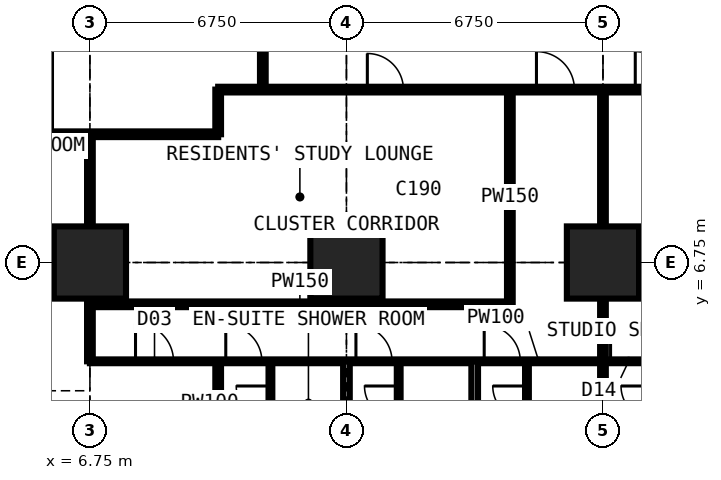
"""IFC4 building model, lengths in metres.
Left out: names, types, materials, properties, quantities, classifications, styles, units other than length and angle.
Written with IfcOpenShell. Run it as: python <this file> out.ifc"""

import sys

from ifc_helpers import new_model, si_unit, direction, frame, frame_2d, origin, origin_2d, place, context, subcontext, project, spatial, rectangle, extrude, element, fill, save


model = new_model("IFC4")
c1 = context("Model", 3, precision=1e-05, world=origin(), true_north=direction((0.0, 1.0)))
c2 = subcontext(c1, "Body", "Model", "MODEL_VIEW")
j1 = project(units=[si_unit("LENGTHUNIT", "METRE"), si_unit("PLANEANGLEUNIT", "RADIAN")], contexts=[c1])
p1 = place(None, origin())
s1 = spatial("IfcSite", under=j1, at=p1, CompositionType="ELEMENT")
p2 = place(p1, origin())
s2 = spatial("IfcBuilding", under=s1, at=p2, CompositionType="ELEMENT")
p3 = place(p2, frame((0.0, 0.0, 18.0)))
s3 = spatial("IfcBuildingStorey", under=s2, at=p3, CompositionType="ELEMENT", Elevation=18.0)
for number, where, z_axis, x_axis in (
    (1, (6.75, 6.75, 0.0), (0.0, 0.0, 1.0), (1.0, 0.0, 0.0)),
    (2, (13.5, 6.75, 0.0), (0.0, 0.0, 1.0), (1.0, 0.0, 0.0)),
    (3, (20.25, 6.75, 0.0), (0.0, 0.0, 1.0), (1.0, 0.0, 0.0)),
):
    element("IfcColumn", number, at=place(p3, frame(where, z_axis=z_axis, x_axis=x_axis)), inside=s3, PredefinedType="COLUMN", context=c2, shape_type="SweptSolid", body=[
        extrude(rectangle(XDim=1.9, YDim=1.9, at=origin_2d()), origin(), (0.0, 0.0, 1.0), 3.6),
    ])
p4 = place(p3, frame((-0.734, 10.125, 0.0), z_axis=(0.0, 0.0, 1.0), x_axis=(1.0, 0.0, 0.0)))
e4 = element("IfcWall", 4, at=p4, inside=s3, PredefinedType="PARTITIONING", context=c2, shape_type="SweptSolid", body=[
    extrude(rectangle(XDim=10.859, YDim=0.15, at=frame_2d((5.429, 0.0))), origin(), (0.0, 0.0, 1.0), 3.375),
])
p5 = place(p3, frame((6.75, 4.15, 0.0), z_axis=(0.0, 0.0, 1.0), x_axis=(0.0, 1.0, 0.0)))
e5 = element("IfcWall", 5, at=p5, inside=s3, PredefinedType="PARTITIONING", context=c2, shape_type="SweptSolid", body=[
    extrude(rectangle(XDim=5.975, YDim=0.15, at=frame_2d((2.988, 0.0))), origin(), (0.0, 0.0, 1.0), 2.877),
])
p6 = place(p3, frame((6.75, 4.15, 0.0), z_axis=(0.0, 0.0, 1.0), x_axis=(1.0, 0.0, 0.0)))
e6 = element("IfcWall", 6, at=p6, inside=s3, PredefinedType="PARTITIONING", context=c2, shape_type="SweptSolid", body=[
    extrude(rectangle(XDim=23.625, YDim=0.1, at=frame_2d((11.812, 0.0))), origin(), (0.0, 0.0, 1.0), 3.375),
])
p7 = place(p6, frame((1.2, 0.0, 0.0)))
e7 = element("IfcOpeningElement", 7, at=p7, cuts=e6, PredefinedType="OPENING", context=c2, shape_type="SweptSolid", body=[
    extrude(rectangle(XDim=1.0, YDim=2.2, at=frame_2d((0.5, 1.1))), frame((0.0, 0.06, 0.0), z_axis=(0.0, -1.0, 0.0), x_axis=(1.0, 0.0, 0.0)), (0.0, 0.0, 1.0), 0.12),
])
p8 = place(p6, frame((3.575, 0.0, 0.0)))
e8 = element("IfcOpeningElement", 8, at=p8, cuts=e6, PredefinedType="OPENING", context=c2, shape_type="SweptSolid", body=[
    extrude(rectangle(XDim=0.95, YDim=2.2, at=frame_2d((0.475, 1.1))), frame((0.0, 0.06, 0.0), z_axis=(0.0, -1.0, 0.0), x_axis=(1.0, 0.0, 0.0)), (0.0, 0.0, 1.0), 0.12),
])
p9 = place(p6, frame((7.0, 0.0, 0.0)))
e9 = element("IfcOpeningElement", 9, at=p9, cuts=e6, PredefinedType="OPENING", context=c2, shape_type="SweptSolid", body=[
    extrude(rectangle(XDim=0.95, YDim=2.2, at=frame_2d((0.475, 1.1))), frame((0.0, 0.06, 0.0), z_axis=(0.0, -1.0, 0.0), x_axis=(1.0, 0.0, 0.0)), (0.0, 0.0, 1.0), 0.12),
])
p10 = place(p6, frame((10.375, 0.0, 0.0)))
e10 = element("IfcOpeningElement", 10, at=p10, cuts=e6, PredefinedType="OPENING", context=c2, shape_type="SweptSolid", body=[
    extrude(rectangle(XDim=0.95, YDim=2.2, at=frame_2d((0.475, 1.1))), frame((0.0, 0.06, 0.0), z_axis=(0.0, -1.0, 0.0), x_axis=(1.0, 0.0, 0.0)), (0.0, 0.0, 1.0), 0.12),
])
p11 = place(p6, frame((13.7, 0.0, 0.0)))
e11 = element("IfcOpeningElement", 11, at=p11, cuts=e6, PredefinedType="OPENING", context=c2, shape_type="SweptSolid", body=[
    extrude(rectangle(XDim=0.95, YDim=2.2, at=frame_2d((0.475, 1.1))), frame((0.0, 0.06, 0.0), z_axis=(0.0, -1.0, 0.0), x_axis=(1.0, 0.0, 0.0)), (0.0, 0.0, 1.0), 0.12),
])
p12 = place(p6, frame((17.125, 0.0, 0.0)))
e12 = element("IfcOpeningElement", 12, at=p12, cuts=e6, PredefinedType="OPENING", context=c2, shape_type="SweptSolid", body=[
    extrude(rectangle(XDim=0.95, YDim=2.2, at=frame_2d((0.475, 1.1))), frame((0.0, 0.06, 0.0), z_axis=(0.0, -1.0, 0.0), x_axis=(1.0, 0.0, 0.0)), (0.0, 0.0, 1.0), 0.12),
])
p13 = place(p6, frame((20.5, 0.0, 0.0)))
e13 = element("IfcOpeningElement", 13, at=p13, cuts=e6, PredefinedType="OPENING", context=c2, shape_type="SweptSolid", body=[
    extrude(rectangle(XDim=0.95, YDim=2.2, at=frame_2d((0.475, 1.1))), frame((0.0, 0.06, 0.0), z_axis=(0.0, -1.0, 0.0), x_axis=(1.0, 0.0, 0.0)), (0.0, 0.0, 1.0), 0.12),
])
p14 = place(p3, frame((6.75, 5.65, 0.0), z_axis=(0.0, 0.0, 1.0), x_axis=(1.0, 0.0, 0.0)))
e14 = element("IfcWall", 14, at=p14, inside=s3, PredefinedType="PARTITIONING", context=c2, shape_type="SweptSolid", body=[
    extrude(rectangle(XDim=11.05, YDim=0.15, at=frame_2d((5.525, 0.0))), origin(), (0.0, 0.0, 1.0), 3.375),
])
p15 = place(p3, frame((10.125, -0.734, 0.0), z_axis=(0.0, 0.0, 1.0), x_axis=(0.0, 1.0, 0.0)))
e15 = element("IfcWall", 15, at=p15, inside=s3, PredefinedType="PARTITIONING", context=c2, shape_type="SweptSolid", body=[
    extrude(rectangle(XDim=4.884, YDim=0.15, at=frame_2d((2.442, 0.0))), origin(), (0.0, 0.0, 1.0), 3.375),
])
p16 = place(p3, frame((10.125, 10.125, 0.0), z_axis=(0.0, 0.0, 1.0), x_axis=(0.0, 1.0, 0.0)))
e16 = element("IfcWall", 16, at=p16, inside=s3, PredefinedType="PARTITIONING", context=c2, shape_type="SweptSolid", body=[
    extrude(rectangle(XDim=1.175, YDim=0.15, at=frame_2d((0.587, 0.0))), origin(), (0.0, 0.0, 1.0), 3.375),
])
p17 = place(p3, frame((10.125, 11.3, 0.0), z_axis=(0.0, 0.0, 1.0), x_axis=(1.0, 0.0, 0.0)))
e17 = element("IfcWall", 17, at=p17, inside=s3, PredefinedType="PARTITIONING", context=c2, shape_type="SweptSolid", body=[
    extrude(rectangle(XDim=20.675, YDim=0.15, at=frame_2d((10.337, 0.0))), origin(), (0.0, 0.0, 1.0), 3.375),
])
p18 = place(p17, frame((8.375, 0.0, 0.0)))
e18 = element("IfcOpeningElement", 18, at=p18, cuts=e17, PredefinedType="OPENING", context=c2, shape_type="SweptSolid", body=[
    extrude(rectangle(XDim=1.0, YDim=2.2, at=frame_2d((0.5, 1.1))), frame((0.0, 0.085, 0.0), z_axis=(0.0, -1.0, 0.0), x_axis=(1.0, 0.0, 0.0)), (0.0, 0.0, 1.0), 0.17),
])
p19 = place(p17, frame((10.975, 0.0, 0.0)))
e19 = element("IfcOpeningElement", 19, at=p19, cuts=e17, PredefinedType="OPENING", context=c2, shape_type="SweptSolid", body=[
    extrude(rectangle(XDim=1.0, YDim=2.2, at=frame_2d((0.5, 1.1))), frame((0.0, 0.085, 0.0), z_axis=(0.0, -1.0, 0.0), x_axis=(1.0, 0.0, 0.0)), (0.0, 0.0, 1.0), 0.17),
])
p20 = place(p17, frame((3.925, 0.0, 0.0)))
e20 = element("IfcOpeningElement", 20, at=p20, cuts=e17, PredefinedType="OPENING", context=c2, shape_type="SweptSolid", body=[
    extrude(rectangle(XDim=0.95, YDim=2.2, at=frame_2d((0.475, 1.1))), frame((0.0, 0.085, 0.0), z_axis=(0.0, -1.0, 0.0), x_axis=(1.0, 0.0, 0.0)), (0.0, 0.0, 1.0), 0.17),
])
p21 = place(p3, frame((11.3, 11.3, 0.0), z_axis=(0.0, 0.0, 1.0), x_axis=(0.0, 1.0, 0.0)))
e21 = element("IfcWall", 21, at=p21, inside=s3, PredefinedType="PARTITIONING", context=c2, shape_type="SweptSolid", body=[
    extrude(rectangle(XDim=19.075, YDim=0.15, at=frame_2d((9.538, 0.0))), origin(), (0.0, 0.0, 1.0), 3.375),
])
p22 = place(p21, frame((10.137, 0.0, 0.0)))
e22 = element("IfcOpeningElement", 22, at=p22, cuts=e21, PredefinedType="OPENING", context=c2, shape_type="SweptSolid", body=[
    extrude(rectangle(XDim=1.0, YDim=2.2, at=frame_2d((0.5, 1.1))), frame((0.0, 0.085, 0.0), z_axis=(0.0, -1.0, 0.0), x_axis=(1.0, 0.0, 0.0)), (0.0, 0.0, 1.0), 0.17),
])
p23 = place(p3, frame((11.5, 1.95, 0.0), z_axis=(0.0, 0.0, 1.0), x_axis=(0.0, 1.0, 0.0)))
e23 = element("IfcWall", 23, at=p23, inside=s3, PredefinedType="PARTITIONING", context=c2, shape_type="SweptSolid", body=[
    extrude(rectangle(XDim=2.2, YDim=0.1, at=frame_2d((1.1, 0.0))), origin(), (0.0, 0.0, 1.0), 3.375),
])
p24 = place(p23, frame((0.65, 0.0, 0.0)))
e24 = element("IfcOpeningElement", 24, at=p24, cuts=e23, PredefinedType="OPENING", context=c2, shape_type="SweptSolid", body=[
    extrude(rectangle(XDim=0.9, YDim=2.2, at=frame_2d((0.45, 1.1))), frame((0.0, 0.06, 0.0), z_axis=(0.0, -1.0, 0.0), x_axis=(1.0, 0.0, 0.0)), (0.0, 0.0, 1.0), 0.12),
])
p25 = place(p3, frame((13.5, -0.734, 0.0), z_axis=(0.0, 0.0, 1.0), x_axis=(0.0, 1.0, 0.0)))
e25 = element("IfcWall", 25, at=p25, inside=s3, PredefinedType="PARTITIONING", context=c2, shape_type="SweptSolid", body=[
    extrude(rectangle(XDim=4.884, YDim=0.175, at=frame_2d((2.442, 0.0))), origin(), (0.0, 0.0, 1.0), 2.877),
])
p26 = place(p3, frame((14.875, 1.95, 0.0), z_axis=(0.0, 0.0, 1.0), x_axis=(0.0, 1.0, 0.0)))
e26 = element("IfcWall", 26, at=p26, inside=s3, PredefinedType="PARTITIONING", context=c2, shape_type="SweptSolid", body=[
    extrude(rectangle(XDim=2.2, YDim=0.1, at=frame_2d((1.1, 0.0))), origin(), (0.0, 0.0, 1.0), 3.375),
])
p27 = place(p26, frame((0.65, 0.0, 0.0)))
e27 = element("IfcOpeningElement", 27, at=p27, cuts=e26, PredefinedType="OPENING", context=c2, shape_type="SweptSolid", body=[
    extrude(rectangle(XDim=0.9, YDim=2.2, at=frame_2d((0.45, 1.1))), frame((0.0, 0.06, 0.0), z_axis=(0.0, -1.0, 0.0), x_axis=(1.0, 0.0, 0.0)), (0.0, 0.0, 1.0), 0.12),
])
p28 = place(p3, frame((16.875, -0.734, 0.0), z_axis=(0.0, 0.0, 1.0), x_axis=(0.0, 1.0, 0.0)))
e28 = element("IfcWall", 28, at=p28, inside=s3, PredefinedType="PARTITIONING", context=c2, shape_type="SweptSolid", body=[
    extrude(rectangle(XDim=4.884, YDim=0.175, at=frame_2d((2.442, 0.0))), origin(), (0.0, 0.0, 1.0), 3.375),
])
p29 = place(p3, frame((17.8, 5.65, 0.0), z_axis=(0.0, 0.0, 1.0), x_axis=(0.0, 1.0, 0.0)))
e29 = element("IfcWall", 29, at=p29, inside=s3, PredefinedType="PARTITIONING", context=c2, shape_type="SweptSolid", body=[
    extrude(rectangle(XDim=5.65, YDim=0.15, at=frame_2d((2.825, 0.0))), origin(), (0.0, 0.0, 1.0), 3.375),
])
p30 = place(p3, frame((18.25, 1.95, 0.0), z_axis=(0.0, 0.0, 1.0), x_axis=(0.0, 1.0, 0.0)))
e30 = element("IfcWall", 30, at=p30, inside=s3, PredefinedType="PARTITIONING", context=c2, shape_type="SweptSolid", body=[
    extrude(rectangle(XDim=2.2, YDim=0.1, at=frame_2d((1.1, 0.0))), origin(), (0.0, 0.0, 1.0), 3.375),
])
p31 = place(p30, frame((0.65, 0.0, 0.0)))
e31 = element("IfcOpeningElement", 31, at=p31, cuts=e30, PredefinedType="OPENING", context=c2, shape_type="SweptSolid", body=[
    extrude(rectangle(XDim=0.9, YDim=2.2, at=frame_2d((0.45, 1.1))), frame((0.0, 0.06, 0.0), z_axis=(0.0, -1.0, 0.0), x_axis=(1.0, 0.0, 0.0)), (0.0, 0.0, 1.0), 0.12),
])
p32 = place(p3, frame((20.25, -0.734, 0.0), z_axis=(0.0, 0.0, 1.0), x_axis=(0.0, 1.0, 0.0)))
e32 = element("IfcWall", 32, at=p32, inside=s3, PredefinedType="PARTITIONING", context=c2, shape_type="SweptSolid", body=[
    extrude(rectangle(XDim=12.034, YDim=0.15, at=frame_2d((6.017, 0.0))), origin(), (0.0, 0.0, 1.0), 2.61),
])
p33 = place(p7, origin())
e33 = element("IfcDoor", 33, at=p33, inside=s3, OperationType="SINGLE_SWING_LEFT", PredefinedType="DOOR", context=c2, shape_type="SweptSolid", body=[
    extrude(rectangle(XDim=1.0, YDim=2.2, at=frame_2d((0.5, 1.1))), frame((0.0, 0.025, 0.0), z_axis=(0.0, -1.0, 0.0), x_axis=(1.0, 0.0, 0.0)), (0.0, 0.0, 1.0), 0.05),
])
fill(e7, e33)
p34 = place(p8, origin())
e34 = element("IfcDoor", 34, at=p34, inside=s3, OperationType="SINGLE_SWING_LEFT", PredefinedType="DOOR", context=c2, shape_type="SweptSolid", body=[
    extrude(rectangle(XDim=0.95, YDim=2.2, at=frame_2d((0.475, 1.1))), frame((0.0, 0.025, 0.0), z_axis=(0.0, -1.0, 0.0), x_axis=(1.0, 0.0, 0.0)), (0.0, 0.0, 1.0), 0.05),
])
fill(e8, e34)
p35 = place(p24, origin())
e35 = element("IfcDoor", 35, at=p35, inside=s3, OperationType="SINGLE_SWING_RIGHT", PredefinedType="DOOR", context=c2, shape_type="SweptSolid", body=[
    extrude(rectangle(XDim=0.9, YDim=2.2, at=frame_2d((0.45, 1.1))), frame((0.0, 0.025, 0.0), z_axis=(0.0, -1.0, 0.0), x_axis=(1.0, 0.0, 0.0)), (0.0, 0.0, 1.0), 0.05),
])
fill(e24, e35)
p36 = place(p9, origin())
e36 = element("IfcDoor", 36, at=p36, inside=s3, OperationType="SINGLE_SWING_LEFT", PredefinedType="DOOR", context=c2, shape_type="SweptSolid", body=[
    extrude(rectangle(XDim=0.95, YDim=2.2, at=frame_2d((0.475, 1.1))), frame((0.0, 0.025, 0.0), z_axis=(0.0, -1.0, 0.0), x_axis=(1.0, 0.0, 0.0)), (0.0, 0.0, 1.0), 0.05),
])
fill(e9, e36)
p37 = place(p27, origin())
e37 = element("IfcDoor", 37, at=p37, inside=s3, OperationType="SINGLE_SWING_RIGHT", PredefinedType="DOOR", context=c2, shape_type="SweptSolid", body=[
    extrude(rectangle(XDim=0.9, YDim=2.2, at=frame_2d((0.45, 1.1))), frame((0.0, 0.025, 0.0), z_axis=(0.0, -1.0, 0.0), x_axis=(1.0, 0.0, 0.0)), (0.0, 0.0, 1.0), 0.05),
])
fill(e27, e37)
p38 = place(p10, origin())
e38 = element("IfcDoor", 38, at=p38, inside=s3, OperationType="SINGLE_SWING_LEFT", PredefinedType="DOOR", context=c2, shape_type="SweptSolid", body=[
    extrude(rectangle(XDim=0.95, YDim=2.2, at=frame_2d((0.475, 1.1))), frame((0.0, 0.025, 0.0), z_axis=(0.0, -1.0, 0.0), x_axis=(1.0, 0.0, 0.0)), (0.0, 0.0, 1.0), 0.05),
])
fill(e10, e38)
p39 = place(p31, origin())
e39 = element("IfcDoor", 39, at=p39, inside=s3, OperationType="SINGLE_SWING_RIGHT", PredefinedType="DOOR", context=c2, shape_type="SweptSolid", body=[
    extrude(rectangle(XDim=0.9, YDim=2.2, at=frame_2d((0.45, 1.1))), frame((0.0, 0.025, 0.0), z_axis=(0.0, -1.0, 0.0), x_axis=(1.0, 0.0, 0.0)), (0.0, 0.0, 1.0), 0.05),
])
fill(e31, e39)
p40 = place(p18, origin())
e40 = element("IfcDoor", 40, at=p40, inside=s3, OperationType="SINGLE_SWING_LEFT", PredefinedType="DOOR", context=c2, shape_type="SweptSolid", body=[
    extrude(rectangle(XDim=1.0, YDim=2.2, at=frame_2d((0.5, 1.1))), frame((0.0, 0.025, 0.0), z_axis=(0.0, -1.0, 0.0), x_axis=(1.0, 0.0, 0.0)), (0.0, 0.0, 1.0), 0.05),
])
fill(e18, e40)
p41 = place(p11, origin())
e41 = element("IfcDoor", 41, at=p41, inside=s3, OperationType="SINGLE_SWING_LEFT", PredefinedType="DOOR", context=c2, shape_type="SweptSolid", body=[
    extrude(rectangle(XDim=0.95, YDim=2.2, at=frame_2d((0.475, 1.1))), frame((0.0, 0.025, 0.0), z_axis=(0.0, -1.0, 0.0), x_axis=(1.0, 0.0, 0.0)), (0.0, 0.0, 1.0), 0.05),
])
fill(e11, e41)
p42 = place(p19, origin())
e42 = element("IfcDoor", 42, at=p42, inside=s3, OperationType="SINGLE_SWING_LEFT", PredefinedType="DOOR", context=c2, shape_type="SweptSolid", body=[
    extrude(rectangle(XDim=1.0, YDim=2.2, at=frame_2d((0.5, 1.1))), frame((0.0, 0.025, 0.0), z_axis=(0.0, -1.0, 0.0), x_axis=(1.0, 0.0, 0.0)), (0.0, 0.0, 1.0), 0.05),
])
fill(e19, e42)
p43 = place(p20, origin())
e43 = element("IfcDoor", 43, at=p43, inside=s3, OperationType="SINGLE_SWING_LEFT", PredefinedType="DOOR", context=c2, shape_type="SweptSolid", body=[
    extrude(rectangle(XDim=0.95, YDim=2.2, at=frame_2d((0.475, 1.1))), frame((0.0, 0.025, 0.0), z_axis=(0.0, -1.0, 0.0), x_axis=(1.0, 0.0, 0.0)), (0.0, 0.0, 1.0), 0.05),
])
fill(e20, e43)
save(model, sys.argv[1])
